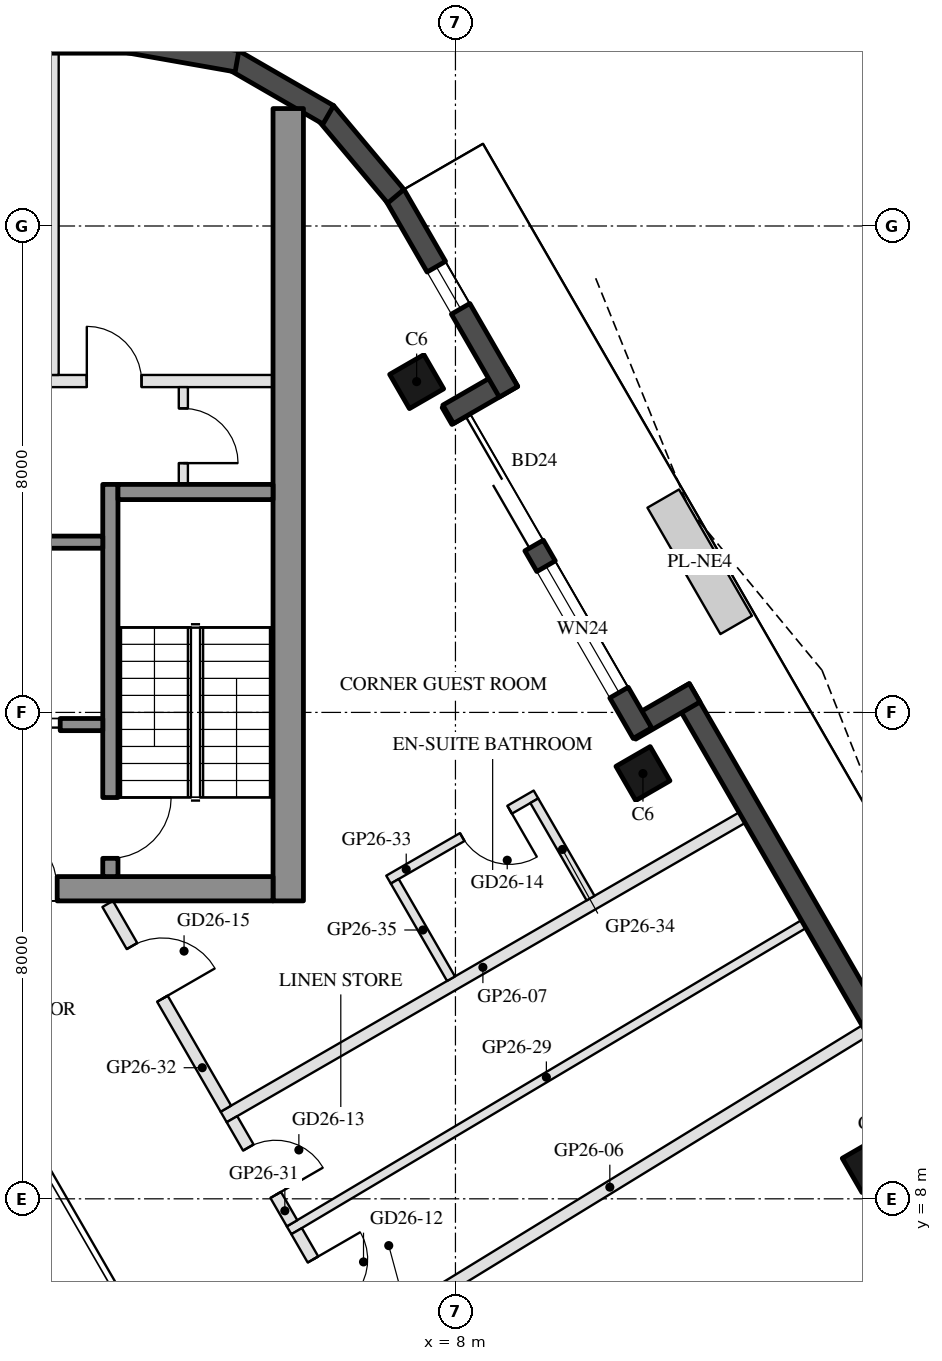
"""IFC4 building model, lengths in metres.
Left out: names, types, materials, properties, quantities, classifications, styles, units other than length and angle.
Written with IfcOpenShell. Run it as: python <this file> out.ifc"""

import sys

from ifc_helpers import new_model, si_unit, direction, frame, frame_2d, origin, origin_2d, place, context, subcontext, project, spatial, rectangle, hollow_rectangle, extrude, boolean, halfspace, element, fill, save


model = new_model("IFC4")
c1 = context("Model", 3, precision=1e-05, world=origin(), true_north=direction((0.0, 1.0)))
c2 = subcontext(c1, "Body", "Model", "MODEL_VIEW")
j1 = project(units=[si_unit("LENGTHUNIT", "METRE"), si_unit("PLANEANGLEUNIT", "RADIAN")], contexts=[c1])
p1 = place(None, origin())
s1 = spatial("IfcSite", under=j1, at=p1, CompositionType="ELEMENT")
p2 = place(p1, origin())
s2 = spatial("IfcBuilding", under=s1, at=p2, CompositionType="ELEMENT")
p3 = place(p2, frame((0.0, 0.0, 268.9)))
s3 = spatial("IfcBuildingStorey", under=s2, at=p3, CompositionType="ELEMENT", Elevation=268.9)
p4 = place(p3, frame((14.805, 8.548, 0.0), z_axis=(0.0, 0.0, 1.0), x_axis=(-0.5, 0.866025403784, 0.0)))
e1 = element("IfcColumn", 1, at=p4, inside=s3, PredefinedType="COLUMN", context=c2, shape_type="SweptSolid", body=[
    boolean("DIFFERENCE", extrude(hollow_rectangle(XDim=0.65, YDim=0.65, WallThickness=0.03, at=origin_2d()), origin(), (0.0, 0.0, 1.0), 3.7), halfspace(frame((0.0, 0.0, 0.037), z_axis=(0.0, 0.0, 1.0), x_axis=(1.0, 0.0, 0.0)), True)),
])
p5 = place(p3, frame((11.083, 14.994, 0.0), z_axis=(0.0, 0.0, 1.0), x_axis=(-0.5, 0.866025403784, 0.0)))
e2 = element("IfcColumn", 2, at=p5, inside=s3, PredefinedType="COLUMN", context=c2, shape_type="SweptSolid", body=[
    boolean("DIFFERENCE", extrude(hollow_rectangle(XDim=0.65, YDim=0.65, WallThickness=0.03, at=origin_2d()), origin(), (0.0, 0.0, 1.0), 3.7), halfspace(frame((0.0, 0.0, 0.04), z_axis=(0.0, 0.0, 1.0), x_axis=(1.0, 0.0, 0.0)), True)),
])
p6 = place(p3, frame((7.362, 21.44, 0.0), z_axis=(0.0, 0.0, 1.0), x_axis=(-0.5, 0.866025403784, 0.0)))
e3 = element("IfcColumn", 3, at=p6, inside=s3, PredefinedType="COLUMN", context=c2, shape_type="SweptSolid", body=[
    boolean("DIFFERENCE", extrude(hollow_rectangle(XDim=0.65, YDim=0.65, WallThickness=0.03, at=origin_2d()), origin(), (0.0, 0.0, 1.0), 3.7), halfspace(frame((0.0, 0.0, 0.047), z_axis=(0.0, 0.0, 1.0), x_axis=(1.0, 0.0, 0.0)), True)),
])
p7 = place(p3, frame((16.316, 8.381, 0.0), z_axis=(0.0, 0.0, 1.0), x_axis=(-0.500005190411, 0.866022407078, 0.0)))
e4 = element("IfcWall", 4, at=p7, inside=s3, PredefinedType="SOLIDWALL", context=c2, shape_type="SweptSolid", body=[
    extrude(rectangle(XDim=9.244, YDim=0.35, at=frame_2d((4.622, 0.0))), origin(), (0.0, 0.0, 1.0), 3.55),
])
p8 = place(p7, frame((1.575, 0.0, 0.3)))
e5 = element("IfcOpeningElement", 5, at=p8, cuts=e4, PredefinedType="OPENING", context=c2, shape_type="SweptSolid", body=[
    extrude(rectangle(XDim=0.8, YDim=2.65, at=frame_2d((0.4, 1.325))), frame((0.0, 0.185, 0.0), z_axis=(0.0, -1.0, 0.0), x_axis=(1.0, 0.0, 0.0)), (0.0, 0.0, 1.0), 0.37),
])
p9 = place(p3, frame((11.934, 16.322, 0.0), z_axis=(0.0, 0.0, 1.0), x_axis=(-0.866005645448, -0.500034220881, 0.0)))
e6 = element("IfcWall", 6, at=p9, inside=s3, PredefinedType="SOLIDWALL", context=c2, shape_type="SweptSolid", body=[
    extrude(rectangle(XDim=1.22, YDim=0.35, at=frame_2d((0.61, 0.0))), origin(), (0.0, 0.0, 1.0), 3.55),
])
p10 = place(p3, frame((11.075, 15.659, 0.0), z_axis=(0.0, 0.0, 1.0), x_axis=(-0.499983676521, 0.866034827944, 0.0)))
e7 = element("IfcWall", 7, at=p10, inside=s3, PredefinedType="SOLIDWALL", context=c2, shape_type="SweptSolid", body=[
    extrude(rectangle(XDim=6.283, YDim=0.35, at=frame_2d((3.142, 0.0))), origin(), (0.0, 0.0, 1.0), 3.55),
])
p11 = place(p10, frame((3.563, 0.0, 0.0)))
e8 = element("IfcOpeningElement", 8, at=p11, cuts=e7, PredefinedType="OPENING", context=c2, shape_type="SweptSolid", body=[
    extrude(rectangle(XDim=2.4, YDim=2.4, at=frame_2d((1.2, 1.2))), frame((0.0, 0.185, 0.0), z_axis=(0.0, -1.0, 0.0), x_axis=(1.0, 0.0, 0.0)), (0.0, 0.0, 1.0), 0.37),
])
p12 = place(p10, frame((0.77, 0.0, 0.3)))
e9 = element("IfcOpeningElement", 9, at=p12, cuts=e7, PredefinedType="OPENING", context=c2, shape_type="SweptSolid", body=[
    extrude(rectangle(XDim=2.4, YDim=2.65, at=frame_2d((1.2, 1.325))), frame((0.0, 0.185, 0.0), z_axis=(0.0, -1.0, 0.0), x_axis=(1.0, 0.0, 0.0)), (0.0, 0.0, 1.0), 0.37),
])
p13 = place(p3, frame((7.88, 20.903, 0.0), z_axis=(0.0, 0.0, 1.0), x_axis=(0.866005645448, 0.500034220881, 0.0)))
e10 = element("IfcWall", 10, at=p13, inside=s3, PredefinedType="SOLIDWALL", context=c2, shape_type="SweptSolid", body=[
    extrude(rectangle(XDim=1.22, YDim=0.35, at=frame_2d((0.61, 0.0))), origin(), (0.0, 0.0, 1.0), 3.55),
])
p14 = place(p3, frame((8.873, 21.274, 0.0), z_axis=(0.0, 0.0, 1.0), x_axis=(-0.50001992892, 0.866013897511, 0.0)))
e11 = element("IfcWall", 11, at=p14, inside=s3, PredefinedType="SOLIDWALL", context=c2, shape_type="SweptSolid", body=[
    extrude(rectangle(XDim=3.741, YDim=0.35, at=frame_2d((1.871, 0.0))), origin(), (0.0, 0.0, 1.0), 3.55),
])
p15 = place(p14, frame((1.575, 0.0, 0.3)))
e12 = element("IfcOpeningElement", 12, at=p15, cuts=e11, PredefinedType="OPENING", context=c2, shape_type="SweptSolid", body=[
    extrude(rectangle(XDim=0.8, YDim=2.65, at=frame_2d((0.4, 1.325))), frame((0.0, 0.185, 0.0), z_axis=(0.0, -1.0, 0.0), x_axis=(1.0, 0.0, 0.0)), (0.0, 0.0, 1.0), 0.37),
])
p16 = place(p3, frame((7.019, 24.489, 0.0), z_axis=(0.0, 0.0, 1.0), x_axis=(-0.642756114672, 0.766070869471, 0.0)))
e13 = element("IfcWall", 13, at=p16, inside=s3, PredefinedType="SOLIDWALL", context=c2, shape_type="SweptSolid", body=[
    extrude(rectangle(XDim=1.8, YDim=0.35, at=frame_2d((0.9, 0.0))), origin(), (0.0, 0.0, 1.0), 3.55),
])
for number, where, z_axis, x_axis in (
    (14, (5.909, 25.829, 0.0), (0.0, 0.0, 1.0), (-0.866, 0.5, 0.0)),
    (15, (4.408, 26.708, 0.0), (0.0, 0.0, 1.0), (-0.985, 0.174, 0.0)),
):
    element("IfcWall", number, at=place(p3, frame(where, z_axis=z_axis, x_axis=x_axis)), inside=s3, PredefinedType="SOLIDWALL", context=c2, shape_type="SweptSolid", body=[
        extrude(rectangle(XDim=1.8, YDim=0.35, at=frame_2d((0.9, 0.0))), origin(), (0.0, 0.0, 1.0), 3.55),
    ])
p17 = place(p3, frame((2.666, 27.018, 0.0), z_axis=(0.0, 0.0, 1.0), x_axis=(-1.0, 0.0, 0.0)))
e16 = element("IfcWall", 16, at=p17, inside=s3, PredefinedType="SOLIDWALL", context=c2, shape_type="SweptSolid", body=[
    extrude(rectangle(XDim=5.331, YDim=0.35, at=frame_2d((2.666, 0.0))), origin(), (0.0, 0.0, 1.0), 3.55),
])
p18 = place(p3, frame((5.25, 12.9, 0.0), z_axis=(0.0, 0.0, 1.0), x_axis=(0.0, 1.0, 0.0)))
e17 = element("IfcWall", 17, at=p18, inside=s3, PredefinedType="SHEAR", context=c2, shape_type="SweptSolid", body=[
    extrude(rectangle(XDim=13.031, YDim=0.5, at=frame_2d((6.516, 0.0))), origin(), (0.0, 0.0, 1.0), 3.5),
])
p19 = place(p3, frame((5.0, 13.1, 0.0), z_axis=(0.0, 0.0, 1.0), x_axis=(-1.0, 0.0, 0.0)))
e18 = element("IfcWall", 18, at=p19, inside=s3, PredefinedType="SHEAR", context=c2, shape_type="SweptSolid", body=[
    extrude(rectangle(XDim=10.0, YDim=0.4, at=frame_2d((5.0, 0.0))), origin(), (0.0, 0.0, 1.0), 3.5),
])
p20 = place(p19, frame((3.55, 0.0, 0.0)))
e19 = element("IfcOpeningElement", 19, at=p20, cuts=e18, PredefinedType="OPENING", context=c2, shape_type="SweptSolid", body=[
    extrude(rectangle(XDim=1.1, YDim=2.1, at=frame_2d((0.55, 1.05))), frame((0.0, 0.21, 0.0), z_axis=(0.0, -1.0, 0.0), x_axis=(1.0, 0.0, 0.0)), (0.0, 0.0, 1.0), 0.42),
])
p21 = place(p19, frame((5.85, 0.0, 0.0)))
e20 = element("IfcOpeningElement", 20, at=p21, cuts=e18, PredefinedType="OPENING", context=c2, shape_type="SweptSolid", body=[
    extrude(rectangle(XDim=1.4, YDim=2.1, at=frame_2d((0.7, 1.05))), frame((0.0, 0.21, 0.0), z_axis=(0.0, -1.0, 0.0), x_axis=(1.0, 0.0, 0.0)), (0.0, 0.0, 1.0), 0.42),
])
p22 = place(p3, frame((2.325, 13.3, 0.0), z_axis=(0.0, 0.0, 1.0), x_axis=(0.0, 1.0, 0.0)))
e21 = element("IfcWall", 21, at=p22, inside=s3, PredefinedType="SHEAR", context=c2, shape_type="SweptSolid", body=[
    extrude(rectangle(XDim=6.45, YDim=0.25, at=frame_2d((3.225, 0.0))), origin(), (0.0, 0.0, 1.0), 3.5),
])
p23 = place(p22, frame((0.3, 0.0, 0.0)))
e22 = element("IfcOpeningElement", 22, at=p23, cuts=e21, PredefinedType="OPENING", context=c2, shape_type="SweptSolid", body=[
    extrude(rectangle(XDim=1.0, YDim=2.1, at=frame_2d((0.5, 1.05))), frame((0.0, 0.135, 0.0), z_axis=(0.0, -1.0, 0.0), x_axis=(1.0, 0.0, 0.0)), (0.0, 0.0, 1.0), 0.27),
])
p24 = place(p3, frame((5.0, 19.625, 0.0), z_axis=(0.0, 0.0, 1.0), x_axis=(-1.0, 0.0, 0.0)))
e23 = element("IfcWall", 23, at=p24, inside=s3, PredefinedType="SHEAR", context=c2, shape_type="SweptSolid", body=[
    extrude(rectangle(XDim=2.55, YDim=0.25, at=frame_2d((1.275, 0.0))), origin(), (0.0, 0.0, 1.0), 3.5),
])
p25 = place(p3, frame((2.2, 18.8, 0.0), z_axis=(0.0, 0.0, 1.0), x_axis=(-1.0, 0.0, 0.0)))
e24 = element("IfcWall", 24, at=p25, inside=s3, PredefinedType="SHEAR", context=c2, shape_type="SweptSolid", body=[
    extrude(rectangle(XDim=2.8, YDim=0.2, at=frame_2d((1.4, 0.0))), origin(), (0.0, 0.0, 1.0), 3.5),
])
p26 = place(p3, frame((2.2, 15.8, 0.0), z_axis=(0.0, 0.0, 1.0), x_axis=(-1.0, 0.0, 0.0)))
e25 = element("IfcWall", 25, at=p26, inside=s3, PredefinedType="SHEAR", context=c2, shape_type="SweptSolid", body=[
    extrude(rectangle(XDim=2.8, YDim=0.2, at=frame_2d((1.4, 0.0))), origin(), (0.0, 0.0, 1.0), 3.5),
])
p27 = place(p26, frame((0.7, 0.0, 0.0)))
e26 = element("IfcOpeningElement", 26, at=p27, cuts=e25, PredefinedType="OPENING", context=c2, shape_type="SweptSolid", body=[
    extrude(rectangle(XDim=1.2, YDim=2.1, at=frame_2d((0.6, 1.05))), frame((0.0, 0.11, 0.0), z_axis=(0.0, -1.0, 0.0), x_axis=(1.0, 0.0, 0.0)), (0.0, 0.0, 1.0), 0.22),
])
p28 = place(p3, frame((5.0, 21.45, 0.0), z_axis=(0.0, 0.0, 1.0), x_axis=(-1.0, 0.0, 0.0)))
e27 = element("IfcWall", 27, at=p28, inside=s3, PredefinedType="PARTITIONING", context=c2, shape_type="SweptSolid", body=[
    extrude(rectangle(XDim=5.4, YDim=0.2, at=frame_2d((2.7, 0.0))), origin(), (0.0, 0.0, 1.0), 3.5),
])
p29 = place(p28, frame((2.163, 0.0, 0.0)))
e28 = element("IfcOpeningElement", 28, at=p29, cuts=e27, PredefinedType="OPENING", context=c2, shape_type="SweptSolid", body=[
    extrude(rectangle(XDim=0.9, YDim=2.1, at=frame_2d((0.45, 1.05))), frame((0.0, 0.11, 0.0), z_axis=(0.0, -1.0, 0.0), x_axis=(1.0, 0.0, 0.0)), (0.0, 0.0, 1.0), 0.22),
])
p30 = place(p28, frame((4.038, 0.0, 0.0)))
e29 = element("IfcOpeningElement", 29, at=p30, cuts=e27, PredefinedType="OPENING", context=c2, shape_type="SweptSolid", body=[
    extrude(rectangle(XDim=0.9, YDim=2.1, at=frame_2d((0.45, 1.05))), frame((0.0, 0.11, 0.0), z_axis=(0.0, -1.0, 0.0), x_axis=(1.0, 0.0, 0.0)), (0.0, 0.0, 1.0), 0.22),
])
p31 = place(p3, frame((3.525, 19.75, 0.0), z_axis=(0.0, 0.0, 1.0), x_axis=(0.0, 1.0, 0.0)))
e30 = element("IfcWall", 30, at=p31, inside=s3, PredefinedType="PARTITIONING", context=c2, shape_type="SweptSolid", body=[
    extrude(rectangle(XDim=1.6, YDim=0.15, at=frame_2d((0.8, 0.0))), origin(), (0.0, 0.0, 1.0), 3.5),
])
p32 = place(p31, frame((0.35, 0.0, 0.0)))
e31 = element("IfcOpeningElement", 31, at=p32, cuts=e30, PredefinedType="OPENING", context=c2, shape_type="SweptSolid", body=[
    extrude(rectangle(XDim=0.9, YDim=2.1, at=frame_2d((0.45, 1.05))), frame((0.0, 0.085, 0.0), z_axis=(0.0, -1.0, 0.0), x_axis=(1.0, 0.0, 0.0)), (0.0, 0.0, 1.0), 0.17),
])
p33 = place(p3, frame((1.4, 21.55, 0.0), z_axis=(0.0, 0.0, 1.0), x_axis=(0.0, 1.0, 0.0)))
e32 = element("IfcWall", 32, at=p33, inside=s3, PredefinedType="PARTITIONING", context=c2, shape_type="SweptSolid", body=[
    extrude(rectangle(XDim=5.292, YDim=0.15, at=frame_2d((2.646, 0.0))), origin(), (0.0, 0.0, 1.0), 3.5),
])
p34 = place(p3, frame((14.737, 10.766, 0.0), z_axis=(0.0, 0.0, 1.0), x_axis=(-0.852501485732, -0.522724800277, 0.0)))
e33 = element("IfcWall", 33, at=p34, inside=s3, PredefinedType="PARTITIONING", context=c2, shape_type="SweptSolid", body=[
    extrude(rectangle(XDim=9.849, YDim=0.2, at=frame_2d((4.925, 0.0))), origin(), (0.0, 0.0, 1.0), 3.16),
])
p35 = place(p3, frame((12.715, 14.269, 0.0), z_axis=(0.0, 0.0, 1.0), x_axis=(-0.866024954444, -0.500000778279, 0.0)))
e34 = element("IfcWall", 34, at=p35, inside=s3, PredefinedType="PARTITIONING", context=c2, shape_type="SweptSolid", body=[
    extrude(rectangle(XDim=9.846, YDim=0.2, at=frame_2d((4.923, 0.0))), origin(), (0.0, 0.0, 1.0), 3.16),
])
p36 = place(p3, frame((13.726, 12.518, 0.0), z_axis=(0.0, 0.0, 1.0), x_axis=(-0.859340362174, -0.511404088699, 0.0)))
e35 = element("IfcWall", 35, at=p36, inside=s3, PredefinedType="PARTITIONING", context=c2, shape_type="SweptSolid", body=[
    extrude(rectangle(XDim=9.847, YDim=0.15, at=frame_2d((4.923, 0.0))), origin(), (0.0, 0.0, 1.0), 3.0),
])
p37 = place(p3, frame((5.388, 7.468, 0.0), z_axis=(0.0, 0.0, 1.0), x_axis=(0.500071767444, -0.865983964866, 0.0)))
e36 = element("IfcWall", 36, at=p37, inside=s3, PredefinedType="PARTITIONING", context=c2, shape_type="SweptSolid", body=[
    extrude(rectangle(XDim=1.976, YDim=0.2, at=frame_2d((0.988, 0.0))), origin(), (0.0, 0.0, 1.0), 3.0),
])
p38 = place(p37, frame((0.538, 0.0, 0.0)))
e37 = element("IfcOpeningElement", 37, at=p38, cuts=e36, PredefinedType="OPENING", context=c2, shape_type="SweptSolid", body=[
    extrude(rectangle(XDim=0.9, YDim=2.1, at=frame_2d((0.45, 1.05))), frame((0.0, 0.11, 0.0), z_axis=(0.0, -1.0, 0.0), x_axis=(1.0, 0.0, 0.0)), (0.0, 0.0, 1.0), 0.22),
])
p39 = place(p3, frame((4.325, 9.31, 0.0), z_axis=(0.0, 0.0, 1.0), x_axis=(0.499925626596, -0.866068339032, 0.0)))
e38 = element("IfcWall", 38, at=p39, inside=s3, PredefinedType="PARTITIONING", context=c2, shape_type="SweptSolid", body=[
    extrude(rectangle(XDim=1.976, YDim=0.2, at=frame_2d((0.988, 0.0))), origin(), (0.0, 0.0, 1.0), 3.55),
])
p40 = place(p39, frame((0.538, 0.0, 0.0)))
e39 = element("IfcOpeningElement", 39, at=p40, cuts=e38, PredefinedType="OPENING", context=c2, shape_type="SweptSolid", body=[
    extrude(rectangle(XDim=0.9, YDim=2.1, at=frame_2d((0.45, 1.05))), frame((0.0, 0.11, 0.0), z_axis=(0.0, -1.0, 0.0), x_axis=(1.0, 0.0, 0.0)), (0.0, 0.0, 1.0), 0.22),
])
p41 = place(p3, frame((2.281, 12.85, 0.0), z_axis=(0.0, 0.0, 1.0), x_axis=(0.500008716408, -0.866020371305, 0.0)))
e40 = element("IfcWall", 40, at=p41, inside=s3, PredefinedType="PARTITIONING", context=c2, shape_type="SweptSolid", body=[
    extrude(rectangle(XDim=3.888, YDim=0.2, at=frame_2d((1.944, 0.0))), origin(), (0.0, 0.0, 1.0), 3.0),
])
p42 = place(p41, frame((0.8, 0.0, 0.0)))
e41 = element("IfcOpeningElement", 41, at=p42, cuts=e40, PredefinedType="OPENING", context=c2, shape_type="SweptSolid", body=[
    extrude(rectangle(XDim=1.0, YDim=2.1, at=frame_2d((0.5, 1.05))), frame((0.0, 0.11, 0.0), z_axis=(0.0, -1.0, 0.0), x_axis=(1.0, 0.0, 0.0)), (0.0, 0.0, 1.0), 0.22),
])
p43 = place(p3, frame((9.324, 14.65, 0.0), z_axis=(0.0, 0.0, 1.0), x_axis=(-0.866034573852, -0.49998411664, 0.0)))
e42 = element("IfcWall", 42, at=p43, inside=s3, PredefinedType="PARTITIONING", context=c2, shape_type="SweptSolid", body=[
    extrude(rectangle(XDim=2.8, YDim=0.15, at=frame_2d((1.4, 0.0))), origin(), (0.0, 0.0, 1.0), 3.55),
])
p44 = place(p43, frame((0.5, 0.0, 0.0)))
e43 = element("IfcOpeningElement", 43, at=p44, cuts=e42, PredefinedType="OPENING", context=c2, shape_type="SweptSolid", body=[
    extrude(rectangle(XDim=0.9, YDim=2.1, at=frame_2d((0.45, 1.05))), frame((0.0, 0.085, 0.0), z_axis=(0.0, -1.0, 0.0), x_axis=(1.0, 0.0, 0.0)), (0.0, 0.0, 1.0), 0.17),
])
for number, where, z_axis, x_axis in (
    (44, (10.222, 12.945, 0.0), (0.0, 0.0, 1.0), (-0.5, 0.866, 0.0)),
    (45, (7.927, 11.62, 0.0), (0.0, 0.0, 1.0), (-0.5, 0.866, 0.0)),
):
    element("IfcWall", number, at=place(p3, frame(where, z_axis=z_axis, x_axis=x_axis)), inside=s3, PredefinedType="PARTITIONING", context=c2, shape_type="SweptSolid", body=[
        extrude(rectangle(XDim=1.85, YDim=0.15, at=frame_2d((0.925, 0.0))), origin(), (0.0, 0.0, 1.0), 3.0),
    ])
p45 = place(p11, frame((2.4, 0.0, 0.0), z_axis=(0.0, 0.0, 1.0), x_axis=(-1.0, 0.0, 0.0)))
e46 = element("IfcDoor", 46, at=p45, inside=s3, OperationType="SLIDING_TO_LEFT", PredefinedType="DOOR", context=c2, shape_type="SweptSolid", body=[
    extrude(rectangle(XDim=2.4, YDim=2.4, at=frame_2d((1.2, 1.2))), frame((0.0, 0.025, 0.0), z_axis=(0.0, -1.0, 0.0), x_axis=(1.0, 0.0, 0.0)), (0.0, 0.0, 1.0), 0.05),
])
fill(e8, e46)
p46 = place(p12, origin())
e47 = element("IfcWindow", 47, at=p46, inside=s3, PartitioningType="SINGLE_PANEL", PredefinedType="WINDOW", context=c2, shape_type="SweptSolid", body=[
    extrude(rectangle(XDim=2.4, YDim=2.65, at=frame_2d((1.2, 1.325))), frame((0.0, 0.03, 0.0), z_axis=(0.0, -1.0, 0.0), x_axis=(1.0, 0.0, 0.0)), (0.0, 0.0, 1.0), 0.06),
])
fill(e9, e47)
p47 = place(p15, origin())
e48 = element("IfcWindow", 48, at=p47, inside=s3, PartitioningType="SINGLE_PANEL", PredefinedType="WINDOW", context=c2, shape_type="SweptSolid", body=[
    extrude(rectangle(XDim=0.8, YDim=2.65, at=frame_2d((0.4, 1.325))), frame((0.0, 0.03, 0.0), z_axis=(0.0, -1.0, 0.0), x_axis=(1.0, 0.0, 0.0)), (0.0, 0.0, 1.0), 0.06),
])
fill(e12, e48)
p48 = place(p27, origin())
e49 = element("IfcDoor", 49, at=p48, inside=s3, OperationType="DOUBLE_DOOR_SLIDING", PredefinedType="DOOR", context=c2, shape_type="SweptSolid", body=[
    extrude(rectangle(XDim=1.2, YDim=2.1, at=frame_2d((0.6, 1.05))), frame((0.0, 0.025, 0.0), z_axis=(0.0, -1.0, 0.0), x_axis=(1.0, 0.0, 0.0)), (0.0, 0.0, 1.0), 0.05),
])
fill(e26, e49)
p49 = place(p32, frame((0.9, 0.0, 0.0), z_axis=(0.0, 0.0, 1.0), x_axis=(-1.0, 0.0, 0.0)))
e50 = element("IfcDoor", 50, at=p49, inside=s3, OperationType="SINGLE_SWING_RIGHT", PredefinedType="DOOR", context=c2, shape_type="SweptSolid", body=[
    extrude(rectangle(XDim=0.9, YDim=2.1, at=frame_2d((0.45, 1.05))), frame((0.0, 0.025, 0.0), z_axis=(0.0, -1.0, 0.0), x_axis=(1.0, 0.0, 0.0)), (0.0, 0.0, 1.0), 0.05),
])
fill(e31, e50)
p50 = place(p29, frame((0.9, 0.0, 0.0), z_axis=(0.0, 0.0, 1.0), x_axis=(-1.0, 0.0, 0.0)))
e51 = element("IfcDoor", 51, at=p50, inside=s3, OperationType="SINGLE_SWING_LEFT", PredefinedType="DOOR", context=c2, shape_type="SweptSolid", body=[
    extrude(rectangle(XDim=0.9, YDim=2.1, at=frame_2d((0.45, 1.05))), frame((0.0, 0.025, 0.0), z_axis=(0.0, -1.0, 0.0), x_axis=(1.0, 0.0, 0.0)), (0.0, 0.0, 1.0), 0.05),
])
fill(e28, e51)
p51 = place(p20, frame((1.1, 0.0, 0.0), z_axis=(0.0, 0.0, 1.0), x_axis=(-1.0, 0.0, 0.0)))
e52 = element("IfcDoor", 52, at=p51, inside=s3, OperationType="SINGLE_SWING_LEFT", PredefinedType="DOOR", context=c2, shape_type="SweptSolid", body=[
    extrude(rectangle(XDim=1.1, YDim=2.1, at=frame_2d((0.55, 1.05))), frame((0.0, 0.025, 0.0), z_axis=(0.0, -1.0, 0.0), x_axis=(1.0, 0.0, 0.0)), (0.0, 0.0, 1.0), 0.05),
])
fill(e19, e52)
p52 = place(p23, frame((1.0, 0.0, 0.0), z_axis=(0.0, 0.0, 1.0), x_axis=(-1.0, 0.0, 0.0)))
e53 = element("IfcDoor", 53, at=p52, inside=s3, OperationType="SINGLE_SWING_LEFT", PredefinedType="DOOR", context=c2, shape_type="SweptSolid", body=[
    extrude(rectangle(XDim=1.0, YDim=2.1, at=frame_2d((0.5, 1.05))), frame((0.0, 0.025, 0.0), z_axis=(0.0, -1.0, 0.0), x_axis=(1.0, 0.0, 0.0)), (0.0, 0.0, 1.0), 0.05),
])
fill(e22, e53)
p53 = place(p38, origin())
e54 = element("IfcDoor", 54, at=p53, inside=s3, OperationType="SINGLE_SWING_LEFT", PredefinedType="DOOR", context=c2, shape_type="SweptSolid", body=[
    extrude(rectangle(XDim=0.9, YDim=2.1, at=frame_2d((0.45, 1.05))), frame((0.0, 0.025, 0.0), z_axis=(0.0, -1.0, 0.0), x_axis=(1.0, 0.0, 0.0)), (0.0, 0.0, 1.0), 0.05),
])
fill(e37, e54)
p54 = place(p40, origin())
e55 = element("IfcDoor", 55, at=p54, inside=s3, OperationType="SINGLE_SWING_RIGHT", PredefinedType="DOOR", context=c2, shape_type="SweptSolid", body=[
    extrude(rectangle(XDim=0.9, YDim=2.1, at=frame_2d((0.45, 1.05))), frame((0.0, 0.025, 0.0), z_axis=(0.0, -1.0, 0.0), x_axis=(1.0, 0.0, 0.0)), (0.0, 0.0, 1.0), 0.05),
])
fill(e39, e55)
p55 = place(p44, origin())
e56 = element("IfcDoor", 56, at=p55, inside=s3, OperationType="SINGLE_SWING_LEFT", PredefinedType="DOOR", context=c2, shape_type="SweptSolid", body=[
    extrude(rectangle(XDim=0.9, YDim=2.1, at=frame_2d((0.45, 1.05))), frame((0.0, 0.025, 0.0), z_axis=(0.0, -1.0, 0.0), x_axis=(1.0, 0.0, 0.0)), (0.0, 0.0, 1.0), 0.05),
])
fill(e43, e56)
p56 = place(p42, origin())
e57 = element("IfcDoor", 57, at=p56, inside=s3, OperationType="SINGLE_SWING_RIGHT", PredefinedType="DOOR", context=c2, shape_type="SweptSolid", body=[
    extrude(rectangle(XDim=1.0, YDim=2.1, at=frame_2d((0.5, 1.05))), frame((0.0, 0.025, 0.0), z_axis=(0.0, -1.0, 0.0), x_axis=(1.0, 0.0, 0.0)), (0.0, 0.0, 1.0), 0.05),
])
fill(e41, e57)
save(model, sys.argv[1])
